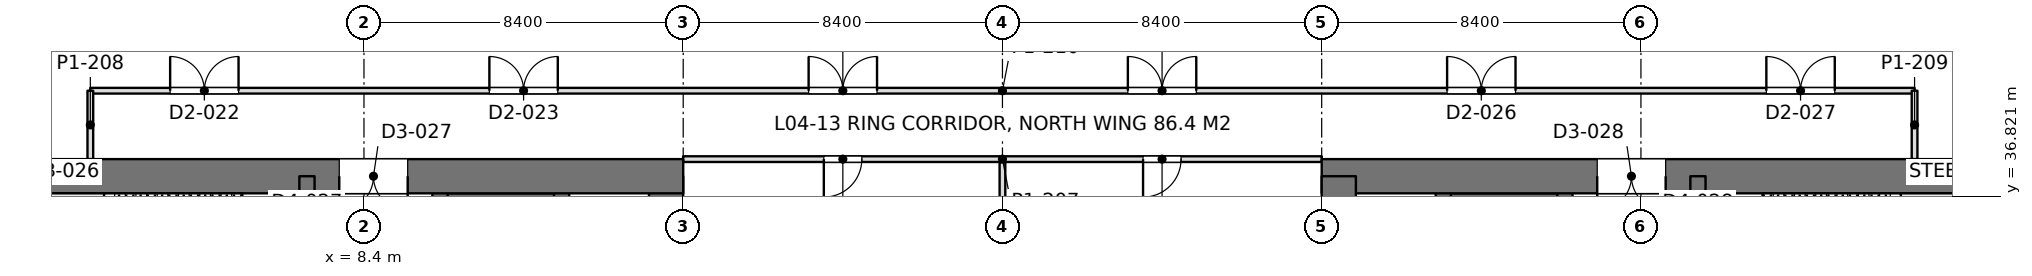
"""IFC4 building model, lengths in metres.
Left out: names, types, materials, properties, quantities, classifications, styles, units other than length and angle.
Written with IfcOpenShell. Run it as: python <this file> out.ifc"""

import sys

from ifc_helpers import new_model, si_unit, direction, frame, frame_2d, origin, place, context, subcontext, project, spatial, rectangle, extrude, element, fill, save


model = new_model("IFC4")
c1 = context("Model", 3, precision=1e-05, world=origin(), true_north=direction((0.0, 1.0)))
c2 = subcontext(c1, "Body", "Model", "MODEL_VIEW")
j1 = project(units=[si_unit("LENGTHUNIT", "METRE"), si_unit("PLANEANGLEUNIT", "RADIAN")], contexts=[c1])
p1 = place(None, origin())
s1 = spatial("IfcSite", under=j1, at=p1, CompositionType="ELEMENT")
p2 = place(p1, origin())
s2 = spatial("IfcBuilding", under=s1, at=p2, CompositionType="ELEMENT")
p3 = place(p2, frame((0.0, 0.0, 18.9)))
s3 = spatial("IfcBuildingStorey", under=s2, at=p3, CompositionType="ELEMENT", Elevation=18.9)
p4 = place(p3, frame((-1.2, 37.35, 0.0), z_axis=(0.0, 0.0, 1.0), x_axis=(1.0, 0.0, 0.0)))
e1 = element("IfcWall", 1, at=p4, inside=s3, PredefinedType="SHEAR", context=c2, shape_type="SweptSolid", body=[
    extrude(rectangle(XDim=18.0, YDim=0.9, at=frame_2d((9.0, 0.0))), origin(), (0.0, 0.0, 1.0), 4.5),
])
p5 = place(p4, frame((8.95, 0.0, 0.0)))
e2 = element("IfcOpeningElement", 2, at=p5, cuts=e1, PredefinedType="OPENING", context=c2, shape_type="SweptSolid", body=[
    extrude(rectangle(XDim=1.8, YDim=2.4, at=frame_2d((0.9, 1.2))), frame((0.0, 0.46, 0.0), z_axis=(0.0, -1.0, 0.0), x_axis=(1.0, 0.0, 0.0)), (0.0, 0.0, 1.0), 0.92),
])
p6 = place(p3, frame((16.35, 13.05, 0.0), z_axis=(0.0, 0.0, 1.0), x_axis=(0.0, 1.0, 0.0)))
e3 = element("IfcWall", 3, at=p6, inside=s3, PredefinedType="SHEAR", context=c2, shape_type="SweptSolid", body=[
    extrude(rectangle(XDim=24.3, YDim=0.9, at=frame_2d((12.15, 0.0))), origin(), (0.0, 0.0, 1.0), 4.5),
])
p7 = place(p3, frame((6.9, 13.05, 0.0), z_axis=(0.0, 0.0, 1.0), x_axis=(0.0, 1.0, 0.0)))
e4 = element("IfcWall", 4, at=p7, inside=s3, PredefinedType="SHEAR", context=c2, shape_type="SweptSolid", body=[
    extrude(rectangle(XDim=24.3, YDim=0.4, at=frame_2d((12.15, 0.0))), origin(), (0.0, 0.0, 1.0), 4.5),
])
p8 = place(p7, frame((1.3, 0.0, 0.0)))
e5 = element("IfcOpeningElement", 5, at=p8, cuts=e4, PredefinedType="OPENING", context=c2, shape_type="SweptSolid", body=[
    extrude(rectangle(XDim=1.0, YDim=2.2, at=frame_2d((0.5, 1.1))), frame((0.0, 0.21, 0.0), z_axis=(0.0, -1.0, 0.0), x_axis=(1.0, 0.0, 0.0)), (0.0, 0.0, 1.0), 0.42),
])
p9 = place(p7, frame((22.0, 0.0, 0.0)))
e6 = element("IfcOpeningElement", 6, at=p9, cuts=e4, PredefinedType="OPENING", context=c2, shape_type="SweptSolid", body=[
    extrude(rectangle(XDim=1.0, YDim=2.2, at=frame_2d((0.5, 1.1))), frame((0.0, 0.21, 0.0), z_axis=(0.0, -1.0, 0.0), x_axis=(1.0, 0.0, 0.0)), (0.0, 0.0, 1.0), 0.42),
])
p10 = place(p7, frame((5.55, 0.0, 0.0)))
e7 = element("IfcOpeningElement", 7, at=p10, cuts=e4, PredefinedType="OPENING", context=c2, shape_type="SweptSolid", body=[
    extrude(rectangle(XDim=1.0, YDim=2.2, at=frame_2d((0.5, 1.1))), frame((0.0, 0.21, 0.0), z_axis=(0.0, -1.0, 0.0), x_axis=(1.0, 0.0, 0.0)), (0.0, 0.0, 1.0), 0.42),
])
p11 = place(p7, frame((9.55, 0.0, 0.0)))
e8 = element("IfcOpeningElement", 8, at=p11, cuts=e4, PredefinedType="OPENING", context=c2, shape_type="SweptSolid", body=[
    extrude(rectangle(XDim=1.0, YDim=2.2, at=frame_2d((0.5, 1.1))), frame((0.0, 0.21, 0.0), z_axis=(0.0, -1.0, 0.0), x_axis=(1.0, 0.0, 0.0)), (0.0, 0.0, 1.0), 0.42),
])
p12 = place(p7, frame((12.8, 0.0, 0.0)))
e9 = element("IfcOpeningElement", 9, at=p12, cuts=e4, PredefinedType="OPENING", context=c2, shape_type="SweptSolid", body=[
    extrude(rectangle(XDim=1.1, YDim=2.2, at=frame_2d((0.55, 1.1))), frame((0.0, 0.21, 0.0), z_axis=(0.0, -1.0, 0.0), x_axis=(1.0, 0.0, 0.0)), (0.0, 0.0, 1.0), 0.42),
])
p13 = place(p7, frame((15.538, 0.0, 0.0)))
e10 = element("IfcOpeningElement", 10, at=p13, cuts=e4, PredefinedType="OPENING", context=c2, shape_type="SweptSolid", body=[
    extrude(rectangle(XDim=1.1, YDim=2.2, at=frame_2d((0.55, 1.1))), frame((0.0, 0.21, 0.0), z_axis=(0.0, -1.0, 0.0), x_axis=(1.0, 0.0, 0.0)), (0.0, 0.0, 1.0), 0.42),
])
p14 = place(p7, frame((18.262, 0.0, 0.0)))
e11 = element("IfcOpeningElement", 11, at=p14, cuts=e4, PredefinedType="OPENING", context=c2, shape_type="SweptSolid", body=[
    extrude(rectangle(XDim=1.1, YDim=2.2, at=frame_2d((0.55, 1.1))), frame((0.0, 0.21, 0.0), z_axis=(0.0, -1.0, 0.0), x_axis=(1.0, 0.0, 0.0)), (0.0, 0.0, 1.0), 0.42),
])
p15 = place(p3, frame((10.4, 13.05, 0.0), z_axis=(0.0, 0.0, 1.0), x_axis=(0.0, 1.0, 0.0)))
e12 = element("IfcWall", 12, at=p15, inside=s3, PredefinedType="SHEAR", context=c2, shape_type="SweptSolid", body=[
    extrude(rectangle(XDim=24.3, YDim=0.4, at=frame_2d((12.15, 0.0))), origin(), (0.0, 0.0, 1.0), 4.5),
])
p16 = place(p15, frame((1.5, 0.0, 0.0)))
e13 = element("IfcOpeningElement", 13, at=p16, cuts=e12, PredefinedType="OPENING", context=c2, shape_type="SweptSolid", body=[
    extrude(rectangle(XDim=1.1, YDim=2.2, at=frame_2d((0.55, 1.1))), frame((0.0, 0.21, 0.0), z_axis=(0.0, -1.0, 0.0), x_axis=(1.0, 0.0, 0.0)), (0.0, 0.0, 1.0), 0.42),
])
p17 = place(p15, frame((4.35, 0.0, 0.0)))
e14 = element("IfcOpeningElement", 14, at=p17, cuts=e12, PredefinedType="OPENING", context=c2, shape_type="SweptSolid", body=[
    extrude(rectangle(XDim=1.1, YDim=2.2, at=frame_2d((0.55, 1.1))), frame((0.0, 0.21, 0.0), z_axis=(0.0, -1.0, 0.0), x_axis=(1.0, 0.0, 0.0)), (0.0, 0.0, 1.0), 0.42),
])
p18 = place(p15, frame((7.2, 0.0, 0.0)))
e15 = element("IfcOpeningElement", 15, at=p18, cuts=e12, PredefinedType="OPENING", context=c2, shape_type="SweptSolid", body=[
    extrude(rectangle(XDim=1.1, YDim=2.2, at=frame_2d((0.55, 1.1))), frame((0.0, 0.21, 0.0), z_axis=(0.0, -1.0, 0.0), x_axis=(1.0, 0.0, 0.0)), (0.0, 0.0, 1.0), 0.42),
])
p19 = place(p15, frame((21.45, 0.0, 0.0)))
e16 = element("IfcOpeningElement", 16, at=p19, cuts=e12, PredefinedType="OPENING", context=c2, shape_type="SweptSolid", body=[
    extrude(rectangle(XDim=1.1, YDim=2.2, at=frame_2d((0.55, 1.1))), frame((0.0, 0.21, 0.0), z_axis=(0.0, -1.0, 0.0), x_axis=(1.0, 0.0, 0.0)), (0.0, 0.0, 1.0), 0.42),
])
p20 = place(p3, frame((13.6, 13.05, 0.0), z_axis=(0.0, 0.0, 1.0), x_axis=(0.0, 1.0, 0.0)))
e17 = element("IfcWall", 17, at=p20, inside=s3, PredefinedType="SHEAR", context=c2, shape_type="SweptSolid", body=[
    extrude(rectangle(XDim=24.3, YDim=0.4, at=frame_2d((12.15, 0.0))), origin(), (0.0, 0.0, 1.0), 4.5),
])
p21 = place(p3, frame((10.4, 36.625, 0.0), z_axis=(0.0, 0.0, 1.0), x_axis=(1.0, 0.0, 0.0)))
e18 = element("IfcWall", 18, at=p21, inside=s3, PredefinedType="SHEAR", context=c2, shape_type="SweptSolid", body=[
    extrude(rectangle(XDim=3.2, YDim=0.55, at=frame_2d((1.6, 0.0))), origin(), (0.0, 0.0, 1.0), 4.5),
])
p22 = place(p3, frame((33.6, 37.35, 0.0), z_axis=(0.0, 0.0, 1.0), x_axis=(1.0, 0.0, 0.0)))
e19 = element("IfcWall", 19, at=p22, inside=s3, PredefinedType="SHEAR", context=c2, shape_type="SweptSolid", body=[
    extrude(rectangle(XDim=18.0, YDim=0.9, at=frame_2d((9.0, 0.0))), origin(), (0.0, 0.0, 1.0), 4.5),
])
p23 = place(p22, frame((7.25, 0.0, 0.0)))
e20 = element("IfcOpeningElement", 20, at=p23, cuts=e19, PredefinedType="OPENING", context=c2, shape_type="SweptSolid", body=[
    extrude(rectangle(XDim=1.8, YDim=2.4, at=frame_2d((0.9, 1.2))), frame((0.0, 0.46, 0.0), z_axis=(0.0, -1.0, 0.0), x_axis=(1.0, 0.0, 0.0)), (0.0, 0.0, 1.0), 0.92),
])
p24 = place(p3, frame((34.05, 13.05, 0.0), z_axis=(0.0, 0.0, 1.0), x_axis=(0.0, 1.0, 0.0)))
e21 = element("IfcWall", 21, at=p24, inside=s3, PredefinedType="SHEAR", context=c2, shape_type="SweptSolid", body=[
    extrude(rectangle(XDim=24.3, YDim=0.9, at=frame_2d((12.15, 0.0))), origin(), (0.0, 0.0, 1.0), 4.5),
])
p25 = place(p3, frame((43.5, 13.05, 0.0), z_axis=(0.0, 0.0, 1.0), x_axis=(0.0, 1.0, 0.0)))
e22 = element("IfcWall", 22, at=p25, inside=s3, PredefinedType="SHEAR", context=c2, shape_type="SweptSolid", body=[
    extrude(rectangle(XDim=24.3, YDim=0.4, at=frame_2d((12.15, 0.0))), origin(), (0.0, 0.0, 1.0), 4.5),
])
p26 = place(p25, frame((1.3, 0.0, 0.0)))
e23 = element("IfcOpeningElement", 23, at=p26, cuts=e22, PredefinedType="OPENING", context=c2, shape_type="SweptSolid", body=[
    extrude(rectangle(XDim=1.0, YDim=2.2, at=frame_2d((0.5, 1.1))), frame((0.0, 0.21, 0.0), z_axis=(0.0, -1.0, 0.0), x_axis=(1.0, 0.0, 0.0)), (0.0, 0.0, 1.0), 0.42),
])
p27 = place(p25, frame((22.0, 0.0, 0.0)))
e24 = element("IfcOpeningElement", 24, at=p27, cuts=e22, PredefinedType="OPENING", context=c2, shape_type="SweptSolid", body=[
    extrude(rectangle(XDim=1.0, YDim=2.2, at=frame_2d((0.5, 1.1))), frame((0.0, 0.21, 0.0), z_axis=(0.0, -1.0, 0.0), x_axis=(1.0, 0.0, 0.0)), (0.0, 0.0, 1.0), 0.42),
])
p28 = place(p25, frame((5.55, 0.0, 0.0)))
e25 = element("IfcOpeningElement", 25, at=p28, cuts=e22, PredefinedType="OPENING", context=c2, shape_type="SweptSolid", body=[
    extrude(rectangle(XDim=1.0, YDim=2.2, at=frame_2d((0.5, 1.1))), frame((0.0, 0.21, 0.0), z_axis=(0.0, -1.0, 0.0), x_axis=(1.0, 0.0, 0.0)), (0.0, 0.0, 1.0), 0.42),
])
p29 = place(p25, frame((9.55, 0.0, 0.0)))
e26 = element("IfcOpeningElement", 26, at=p29, cuts=e22, PredefinedType="OPENING", context=c2, shape_type="SweptSolid", body=[
    extrude(rectangle(XDim=1.0, YDim=2.2, at=frame_2d((0.5, 1.1))), frame((0.0, 0.21, 0.0), z_axis=(0.0, -1.0, 0.0), x_axis=(1.0, 0.0, 0.0)), (0.0, 0.0, 1.0), 0.42),
])
p30 = place(p25, frame((12.8, 0.0, 0.0)))
e27 = element("IfcOpeningElement", 27, at=p30, cuts=e22, PredefinedType="OPENING", context=c2, shape_type="SweptSolid", body=[
    extrude(rectangle(XDim=1.1, YDim=2.2, at=frame_2d((0.55, 1.1))), frame((0.0, 0.21, 0.0), z_axis=(0.0, -1.0, 0.0), x_axis=(1.0, 0.0, 0.0)), (0.0, 0.0, 1.0), 0.42),
])
p31 = place(p25, frame((15.538, 0.0, 0.0)))
e28 = element("IfcOpeningElement", 28, at=p31, cuts=e22, PredefinedType="OPENING", context=c2, shape_type="SweptSolid", body=[
    extrude(rectangle(XDim=1.1, YDim=2.2, at=frame_2d((0.55, 1.1))), frame((0.0, 0.21, 0.0), z_axis=(0.0, -1.0, 0.0), x_axis=(1.0, 0.0, 0.0)), (0.0, 0.0, 1.0), 0.42),
])
p32 = place(p25, frame((18.262, 0.0, 0.0)))
e29 = element("IfcOpeningElement", 29, at=p32, cuts=e22, PredefinedType="OPENING", context=c2, shape_type="SweptSolid", body=[
    extrude(rectangle(XDim=1.1, YDim=2.2, at=frame_2d((0.55, 1.1))), frame((0.0, 0.21, 0.0), z_axis=(0.0, -1.0, 0.0), x_axis=(1.0, 0.0, 0.0)), (0.0, 0.0, 1.0), 0.42),
])
p33 = place(p3, frame((40.0, 13.05, 0.0), z_axis=(0.0, 0.0, 1.0), x_axis=(0.0, 1.0, 0.0)))
e30 = element("IfcWall", 30, at=p33, inside=s3, PredefinedType="SHEAR", context=c2, shape_type="SweptSolid", body=[
    extrude(rectangle(XDim=24.3, YDim=0.4, at=frame_2d((12.15, 0.0))), origin(), (0.0, 0.0, 1.0), 4.5),
])
p34 = place(p33, frame((1.5, 0.0, 0.0)))
e31 = element("IfcOpeningElement", 31, at=p34, cuts=e30, PredefinedType="OPENING", context=c2, shape_type="SweptSolid", body=[
    extrude(rectangle(XDim=1.1, YDim=2.2, at=frame_2d((0.55, 1.1))), frame((0.0, 0.21, 0.0), z_axis=(0.0, -1.0, 0.0), x_axis=(1.0, 0.0, 0.0)), (0.0, 0.0, 1.0), 0.42),
])
p35 = place(p33, frame((4.35, 0.0, 0.0)))
e32 = element("IfcOpeningElement", 32, at=p35, cuts=e30, PredefinedType="OPENING", context=c2, shape_type="SweptSolid", body=[
    extrude(rectangle(XDim=1.1, YDim=2.2, at=frame_2d((0.55, 1.1))), frame((0.0, 0.21, 0.0), z_axis=(0.0, -1.0, 0.0), x_axis=(1.0, 0.0, 0.0)), (0.0, 0.0, 1.0), 0.42),
])
p36 = place(p33, frame((7.2, 0.0, 0.0)))
e33 = element("IfcOpeningElement", 33, at=p36, cuts=e30, PredefinedType="OPENING", context=c2, shape_type="SweptSolid", body=[
    extrude(rectangle(XDim=1.1, YDim=2.2, at=frame_2d((0.55, 1.1))), frame((0.0, 0.21, 0.0), z_axis=(0.0, -1.0, 0.0), x_axis=(1.0, 0.0, 0.0)), (0.0, 0.0, 1.0), 0.42),
])
p37 = place(p33, frame((21.45, 0.0, 0.0)))
e34 = element("IfcOpeningElement", 34, at=p37, cuts=e30, PredefinedType="OPENING", context=c2, shape_type="SweptSolid", body=[
    extrude(rectangle(XDim=1.1, YDim=2.2, at=frame_2d((0.55, 1.1))), frame((0.0, 0.21, 0.0), z_axis=(0.0, -1.0, 0.0), x_axis=(1.0, 0.0, 0.0)), (0.0, 0.0, 1.0), 0.42),
])
p38 = place(p3, frame((36.8, 13.05, 0.0), z_axis=(0.0, 0.0, 1.0), x_axis=(0.0, 1.0, 0.0)))
e35 = element("IfcWall", 35, at=p38, inside=s3, PredefinedType="SHEAR", context=c2, shape_type="SweptSolid", body=[
    extrude(rectangle(XDim=24.3, YDim=0.4, at=frame_2d((12.15, 0.0))), origin(), (0.0, 0.0, 1.0), 4.5),
])
p39 = place(p3, frame((40.0, 36.625, 0.0), z_axis=(0.0, 0.0, 1.0), x_axis=(-1.0, 0.0, 0.0)))
e36 = element("IfcWall", 36, at=p39, inside=s3, PredefinedType="SHEAR", context=c2, shape_type="SweptSolid", body=[
    extrude(rectangle(XDim=3.2, YDim=0.55, at=frame_2d((1.6, 0.0))), origin(), (0.0, 0.0, 1.0), 4.5),
])
p40 = place(p3, frame((1.2, 39.6, 0.0), z_axis=(0.0, 0.0, 1.0), x_axis=(1.0, 0.0, 0.0)))
e37 = element("IfcWall", 37, at=p40, inside=s3, PredefinedType="PARTITIONING", context=c2, shape_type="SweptSolid", body=[
    extrude(rectangle(XDim=48.0, YDim=0.15, at=frame_2d((24.0, 0.0))), origin(), (0.0, 0.0, 1.0), 3.74),
])
p41 = place(p40, frame((2.1, 0.0, 0.0)))
e38 = element("IfcOpeningElement", 38, at=p41, cuts=e37, PredefinedType="OPENING", context=c2, shape_type="SweptSolid", body=[
    extrude(rectangle(XDim=1.8, YDim=2.2, at=frame_2d((0.9, 1.1))), frame((0.0, 0.085, 0.0), z_axis=(0.0, -1.0, 0.0), x_axis=(1.0, 0.0, 0.0)), (0.0, 0.0, 1.0), 0.17),
])
p42 = place(p40, frame((10.5, 0.0, 0.0)))
e39 = element("IfcOpeningElement", 39, at=p42, cuts=e37, PredefinedType="OPENING", context=c2, shape_type="SweptSolid", body=[
    extrude(rectangle(XDim=1.8, YDim=2.2, at=frame_2d((0.9, 1.1))), frame((0.0, 0.085, 0.0), z_axis=(0.0, -1.0, 0.0), x_axis=(1.0, 0.0, 0.0)), (0.0, 0.0, 1.0), 0.17),
])
p43 = place(p40, frame((18.9, 0.0, 0.0)))
e40 = element("IfcOpeningElement", 40, at=p43, cuts=e37, PredefinedType="OPENING", context=c2, shape_type="SweptSolid", body=[
    extrude(rectangle(XDim=1.8, YDim=2.2, at=frame_2d((0.9, 1.1))), frame((0.0, 0.085, 0.0), z_axis=(0.0, -1.0, 0.0), x_axis=(1.0, 0.0, 0.0)), (0.0, 0.0, 1.0), 0.17),
])
p44 = place(p40, frame((27.3, 0.0, 0.0)))
e41 = element("IfcOpeningElement", 41, at=p44, cuts=e37, PredefinedType="OPENING", context=c2, shape_type="SweptSolid", body=[
    extrude(rectangle(XDim=1.8, YDim=2.2, at=frame_2d((0.9, 1.1))), frame((0.0, 0.085, 0.0), z_axis=(0.0, -1.0, 0.0), x_axis=(1.0, 0.0, 0.0)), (0.0, 0.0, 1.0), 0.17),
])
p45 = place(p40, frame((35.7, 0.0, 0.0)))
e42 = element("IfcOpeningElement", 42, at=p45, cuts=e37, PredefinedType="OPENING", context=c2, shape_type="SweptSolid", body=[
    extrude(rectangle(XDim=1.8, YDim=2.2, at=frame_2d((0.9, 1.1))), frame((0.0, 0.085, 0.0), z_axis=(0.0, -1.0, 0.0), x_axis=(1.0, 0.0, 0.0)), (0.0, 0.0, 1.0), 0.17),
])
p46 = place(p40, frame((44.1, 0.0, 0.0)))
e43 = element("IfcOpeningElement", 43, at=p46, cuts=e37, PredefinedType="OPENING", context=c2, shape_type="SweptSolid", body=[
    extrude(rectangle(XDim=1.8, YDim=2.2, at=frame_2d((0.9, 1.1))), frame((0.0, 0.085, 0.0), z_axis=(0.0, -1.0, 0.0), x_axis=(1.0, 0.0, 0.0)), (0.0, 0.0, 1.0), 0.17),
])
for number, where, z_axis, x_axis in (
    (44, (1.2, 37.8, 0.0), (0.0, 0.0, 1.0), (0.0, 1.0, 0.0)),
    (45, (49.2, 37.8, 0.0), (0.0, 0.0, 1.0), (0.0, 1.0, 0.0)),
):
    element("IfcWall", number, at=place(p3, frame(where, z_axis=z_axis, x_axis=x_axis)), inside=s3, PredefinedType="PARTITIONING", context=c2, shape_type="SweptSolid", body=[
        extrude(rectangle(XDim=1.8, YDim=0.15, at=frame_2d((0.9, 0.0))), origin(), (0.0, 0.0, 1.0), 4.34),
    ])
p47 = place(p3, frame((25.2, 34.199, 0.0), z_axis=(0.0, 0.0, 1.0), x_axis=(0.0, 1.0, 0.0)))
e46 = element("IfcWall", 46, at=p47, inside=s3, PredefinedType="PARTITIONING", context=c2, shape_type="SweptSolid", body=[
    extrude(rectangle(XDim=3.527, YDim=0.15, at=frame_2d((1.764, 0.0))), origin(), (0.0, 0.0, 1.0), 3.74),
])
p48 = place(p3, frame((16.798, 37.8, 0.0), z_axis=(0.0, 0.0, 1.0), x_axis=(1.0, 0.0, 0.0)))
e47 = element("IfcWall", 47, at=p48, inside=s3, PredefinedType="PARTITIONING", context=c2, shape_type="SweptSolid", body=[
    extrude(rectangle(XDim=16.804, YDim=0.15, at=frame_2d((8.402, 0.0))), origin(), (0.0, 0.0, 1.0), 3.74),
])
p49 = place(p48, frame((3.702, 0.0, 0.0)))
e48 = element("IfcOpeningElement", 48, at=p49, cuts=e47, PredefinedType="OPENING", context=c2, shape_type="SweptSolid", body=[
    extrude(rectangle(XDim=1.0, YDim=2.2, at=frame_2d((0.5, 1.1))), frame((0.0, 0.085, 0.0), z_axis=(0.0, -1.0, 0.0), x_axis=(1.0, 0.0, 0.0)), (0.0, 0.0, 1.0), 0.17),
])
p50 = place(p48, frame((12.102, 0.0, 0.0)))
e49 = element("IfcOpeningElement", 49, at=p50, cuts=e47, PredefinedType="OPENING", context=c2, shape_type="SweptSolid", body=[
    extrude(rectangle(XDim=1.0, YDim=2.2, at=frame_2d((0.5, 1.1))), frame((0.0, 0.085, 0.0), z_axis=(0.0, -1.0, 0.0), x_axis=(1.0, 0.0, 0.0)), (0.0, 0.0, 1.0), 0.17),
])
p51 = place(p5, frame((1.8, 0.0, 0.0), z_axis=(0.0, 0.0, 1.0), x_axis=(-1.0, 0.0, 0.0)))
e50 = element("IfcDoor", 50, at=p51, inside=s3, OperationType="DOUBLE_DOOR_SINGLE_SWING", PredefinedType="DOOR", context=c2, shape_type="SweptSolid", body=[
    extrude(rectangle(XDim=1.8, YDim=2.4, at=frame_2d((0.9, 1.2))), frame((0.0, 0.025, 0.0), z_axis=(0.0, -1.0, 0.0), x_axis=(1.0, 0.0, 0.0)), (0.0, 0.0, 1.0), 0.05),
])
fill(e2, e50)
p52 = place(p23, frame((1.8, 0.0, 0.0), z_axis=(0.0, 0.0, 1.0), x_axis=(-1.0, 0.0, 0.0)))
e51 = element("IfcDoor", 51, at=p52, inside=s3, OperationType="DOUBLE_DOOR_SINGLE_SWING", PredefinedType="DOOR", context=c2, shape_type="SweptSolid", body=[
    extrude(rectangle(XDim=1.8, YDim=2.4, at=frame_2d((0.9, 1.2))), frame((0.0, 0.025, 0.0), z_axis=(0.0, -1.0, 0.0), x_axis=(1.0, 0.0, 0.0)), (0.0, 0.0, 1.0), 0.05),
])
fill(e20, e51)
p53 = place(p41, origin())
e52 = element("IfcDoor", 52, at=p53, inside=s3, OperationType="DOUBLE_DOOR_SINGLE_SWING", PredefinedType="DOOR", context=c2, shape_type="SweptSolid", body=[
    extrude(rectangle(XDim=1.8, YDim=2.2, at=frame_2d((0.9, 1.1))), frame((0.0, 0.025, 0.0), z_axis=(0.0, -1.0, 0.0), x_axis=(1.0, 0.0, 0.0)), (0.0, 0.0, 1.0), 0.05),
])
fill(e38, e52)
p54 = place(p42, origin())
e53 = element("IfcDoor", 53, at=p54, inside=s3, OperationType="DOUBLE_DOOR_SINGLE_SWING", PredefinedType="DOOR", context=c2, shape_type="SweptSolid", body=[
    extrude(rectangle(XDim=1.8, YDim=2.2, at=frame_2d((0.9, 1.1))), frame((0.0, 0.025, 0.0), z_axis=(0.0, -1.0, 0.0), x_axis=(1.0, 0.0, 0.0)), (0.0, 0.0, 1.0), 0.05),
])
fill(e39, e53)
p55 = place(p43, origin())
e54 = element("IfcDoor", 54, at=p55, inside=s3, OperationType="DOUBLE_DOOR_SINGLE_SWING", PredefinedType="DOOR", context=c2, shape_type="SweptSolid", body=[
    extrude(rectangle(XDim=1.8, YDim=2.2, at=frame_2d((0.9, 1.1))), frame((0.0, 0.025, 0.0), z_axis=(0.0, -1.0, 0.0), x_axis=(1.0, 0.0, 0.0)), (0.0, 0.0, 1.0), 0.05),
])
fill(e40, e54)
p56 = place(p44, origin())
e55 = element("IfcDoor", 55, at=p56, inside=s3, OperationType="DOUBLE_DOOR_SINGLE_SWING", PredefinedType="DOOR", context=c2, shape_type="SweptSolid", body=[
    extrude(rectangle(XDim=1.8, YDim=2.2, at=frame_2d((0.9, 1.1))), frame((0.0, 0.025, 0.0), z_axis=(0.0, -1.0, 0.0), x_axis=(1.0, 0.0, 0.0)), (0.0, 0.0, 1.0), 0.05),
])
fill(e41, e55)
p57 = place(p45, origin())
e56 = element("IfcDoor", 56, at=p57, inside=s3, OperationType="DOUBLE_DOOR_SINGLE_SWING", PredefinedType="DOOR", context=c2, shape_type="SweptSolid", body=[
    extrude(rectangle(XDim=1.8, YDim=2.2, at=frame_2d((0.9, 1.1))), frame((0.0, 0.025, 0.0), z_axis=(0.0, -1.0, 0.0), x_axis=(1.0, 0.0, 0.0)), (0.0, 0.0, 1.0), 0.05),
])
fill(e42, e56)
p58 = place(p46, origin())
e57 = element("IfcDoor", 57, at=p58, inside=s3, OperationType="DOUBLE_DOOR_SINGLE_SWING", PredefinedType="DOOR", context=c2, shape_type="SweptSolid", body=[
    extrude(rectangle(XDim=1.8, YDim=2.2, at=frame_2d((0.9, 1.1))), frame((0.0, 0.025, 0.0), z_axis=(0.0, -1.0, 0.0), x_axis=(1.0, 0.0, 0.0)), (0.0, 0.0, 1.0), 0.05),
])
fill(e43, e57)
p59 = place(p49, frame((1.0, 0.0, 0.0), z_axis=(0.0, 0.0, 1.0), x_axis=(-1.0, 0.0, 0.0)))
e58 = element("IfcDoor", 58, at=p59, inside=s3, OperationType="SINGLE_SWING_RIGHT", PredefinedType="DOOR", context=c2, shape_type="SweptSolid", body=[
    extrude(rectangle(XDim=1.0, YDim=2.2, at=frame_2d((0.5, 1.1))), frame((0.0, 0.025, 0.0), z_axis=(0.0, -1.0, 0.0), x_axis=(1.0, 0.0, 0.0)), (0.0, 0.0, 1.0), 0.05),
])
fill(e48, e58)
p60 = place(p50, frame((1.0, 0.0, 0.0), z_axis=(0.0, 0.0, 1.0), x_axis=(-1.0, 0.0, 0.0)))
e59 = element("IfcDoor", 59, at=p60, inside=s3, OperationType="SINGLE_SWING_RIGHT", PredefinedType="DOOR", context=c2, shape_type="SweptSolid", body=[
    extrude(rectangle(XDim=1.0, YDim=2.2, at=frame_2d((0.5, 1.1))), frame((0.0, 0.025, 0.0), z_axis=(0.0, -1.0, 0.0), x_axis=(1.0, 0.0, 0.0)), (0.0, 0.0, 1.0), 0.05),
])
fill(e49, e59)
save(model, sys.argv[1])
